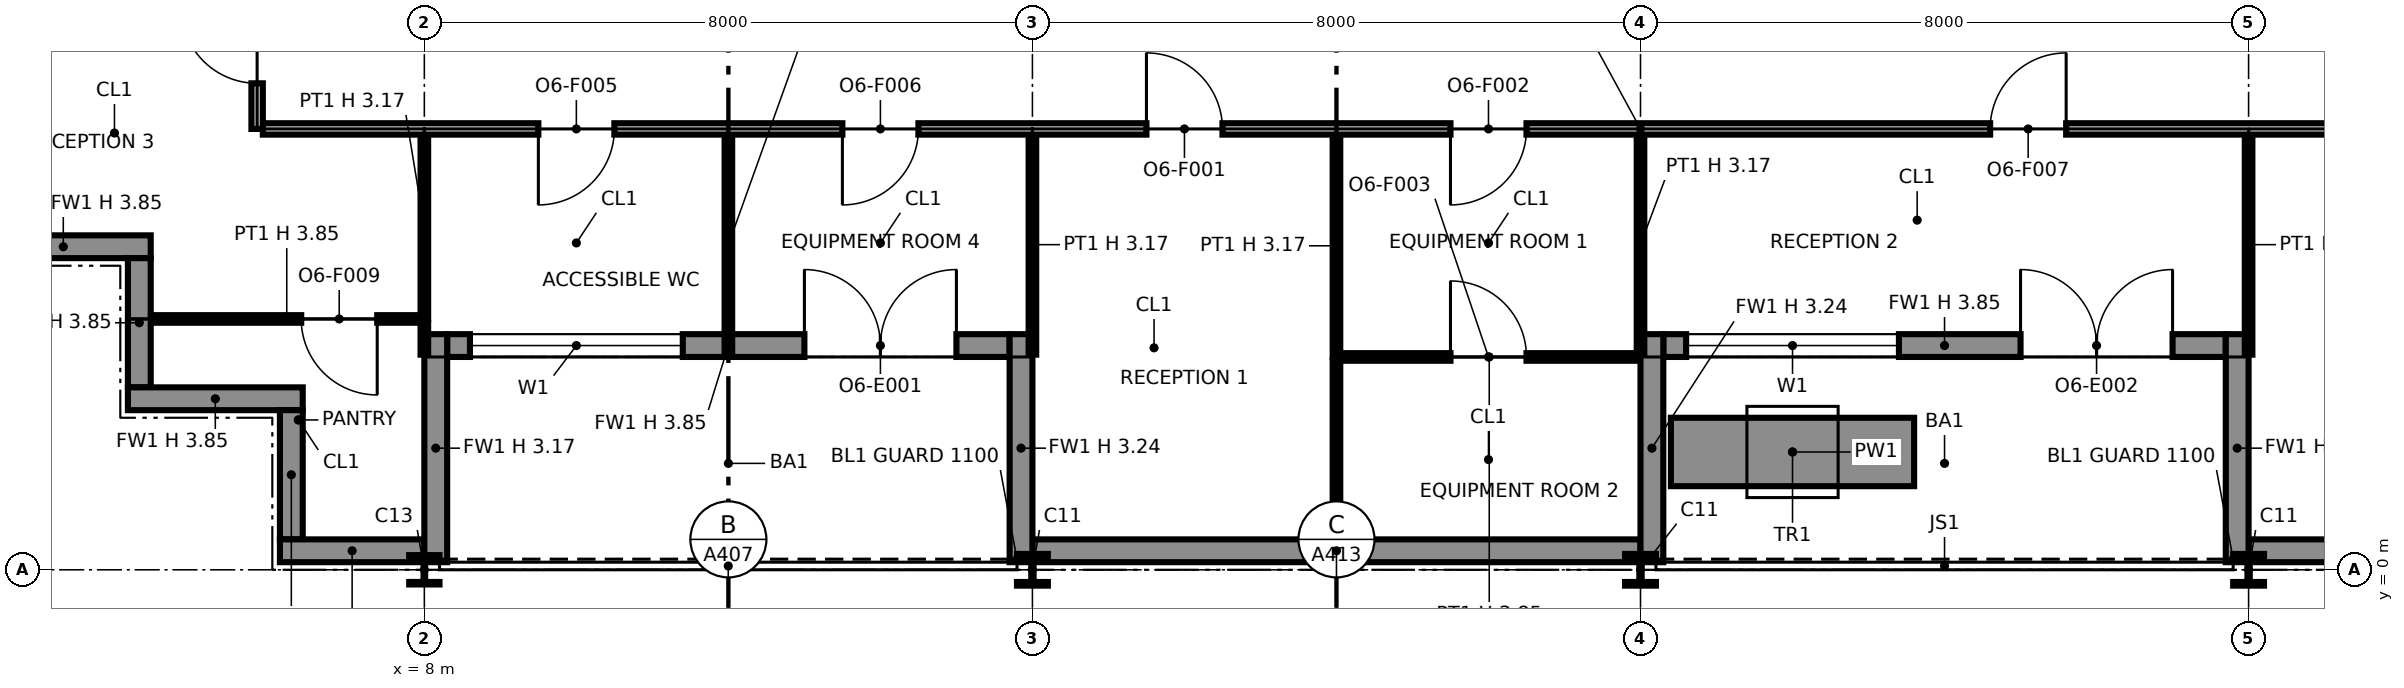
"""IFC4 building model, lengths in metres.
Left out: names, types, materials, properties, quantities, classifications, styles, units other than length and angle.
Written with IfcOpenShell. Run it as: python <this file> out.ifc"""

import sys

from ifc_helpers import new_model, si_unit, direction, frame, frame_2d, origin, origin_2d, place, context, subcontext, project, spatial, polyline, rectangle, i_section, outline, extrude, element, fill, save


model = new_model("IFC4")
c1 = context("Model", 3, precision=1e-05, world=origin(), true_north=direction((0.0, 1.0)))
c2 = subcontext(c1, "Body", "Model", "MODEL_VIEW")
j1 = project(units=[si_unit("LENGTHUNIT", "METRE"), si_unit("PLANEANGLEUNIT", "RADIAN")], contexts=[c1])
p1 = place(None, origin())
s1 = spatial("IfcSite", under=j1, at=p1, CompositionType="ELEMENT")
p2 = place(p1, origin())
s2 = spatial("IfcBuilding", under=s1, at=p2, CompositionType="ELEMENT")
p3 = place(p2, frame((0.0, 0.0, 233.0)))
s3 = spatial("IfcBuildingStorey", under=s2, at=p3, CompositionType="ELEMENT", Elevation=233.0)
p4 = place(p3, frame((8.0, 0.0, 0.0), z_axis=(0.0, 0.0, 1.0), x_axis=(1.0, 0.0, 0.0)))
e1 = element("IfcColumn", 1, at=p4, inside=s3, PredefinedType="COLUMN", context=c2, shape_type="SweptSolid", body=[
    extrude(i_section(OverallWidth=0.399, OverallDepth=0.386, WebThickness=0.021, FlangeThickness=0.033, at=origin_2d()), origin(), (0.0, 0.0, 1.0), 3.85),
])
for number, where, z_axis, x_axis in (
    (2, (16.0, 0.0, 0.0), (0.0, 0.0, 1.0), (1.0, 0.0, 0.0)),
    (3, (24.0, 0.0, 0.0), (0.0, 0.0, 1.0), (1.0, 0.0, 0.0)),
    (4, (32.0, 0.0, 0.0), (0.0, 0.0, 1.0), (1.0, 0.0, 0.0)),
):
    element("IfcColumn", number, at=place(p3, frame(where, z_axis=z_axis, x_axis=x_axis)), inside=s3, PredefinedType="COLUMN", context=c2, shape_type="SweptSolid", body=[
        extrude(i_section(OverallWidth=0.406, OverallDepth=0.417, WebThickness=0.03, FlangeThickness=0.048, at=origin_2d()), origin(), (0.0, 0.0, 1.0), 3.85),
    ])
p5 = place(p3, frame((2.1, 4.25, 0.0), z_axis=(0.0, 0.0, 1.0), x_axis=(1.0, 0.0, 0.0)))
e5 = element("IfcWall", 5, at=p5, inside=s3, PredefinedType="SOLIDWALL", context=c2, shape_type="SweptSolid", body=[
    extrude(rectangle(XDim=2.3, YDim=0.3, at=frame_2d((1.15, 0.0))), origin(), (0.0, 0.0, 1.0), 3.85),
])
p6 = place(p3, frame((4.25, 4.1, 0.0), z_axis=(0.0, 0.0, 1.0), x_axis=(0.0, -1.0, 0.0)))
e6 = element("IfcWall", 6, at=p6, inside=s3, PredefinedType="SOLIDWALL", context=c2, shape_type="SweptSolid", body=[
    extrude(rectangle(XDim=1.7, YDim=0.3, at=frame_2d((0.85, 0.0))), origin(), (0.0, 0.0, 1.0), 3.85),
])
p7 = place(p3, frame((4.1, 2.25, 0.0), z_axis=(0.0, 0.0, 1.0), x_axis=(1.0, 0.0, 0.0)))
e7 = element("IfcWall", 7, at=p7, inside=s3, PredefinedType="SOLIDWALL", context=c2, shape_type="SweptSolid", body=[
    extrude(rectangle(XDim=2.3, YDim=0.3, at=frame_2d((1.15, 0.0))), origin(), (0.0, 0.0, 1.0), 3.85),
])
p8 = place(p3, frame((6.25, 2.1, 0.0), z_axis=(0.0, 0.0, 1.0), x_axis=(0.0, -1.0, 0.0)))
e8 = element("IfcWall", 8, at=p8, inside=s3, PredefinedType="SOLIDWALL", context=c2, shape_type="SweptSolid", body=[
    extrude(rectangle(XDim=1.7, YDim=0.3, at=frame_2d((0.85, 0.0))), origin(), (0.0, 0.0, 1.0), 3.85),
])
p9 = place(p3, frame((6.1, 0.25, 0.0), z_axis=(0.0, 0.0, 1.0), x_axis=(1.0, 0.0, 0.0)))
e9 = element("IfcWall", 9, at=p9, inside=s3, PredefinedType="SOLIDWALL", context=c2, shape_type="SweptSolid", body=[
    extrude(rectangle(XDim=1.9, YDim=0.3, at=frame_2d((0.95, 0.0))), origin(), (0.0, 0.0, 1.0), 3.85),
])
p10 = place(p3, frame((8.3, 2.95, 0.0), z_axis=(0.0, 0.0, 1.0), x_axis=(1.0, 0.0, 0.0)))
e10 = element("IfcWall", 10, at=p10, inside=s3, PredefinedType="SOLIDWALL", context=c2, shape_type="SweptSolid", body=[
    extrude(rectangle(XDim=7.4, YDim=0.3, at=frame_2d((3.7, 0.0))), origin(), (0.0, 0.0, 1.0), 3.85),
])
p11 = place(p10, frame((0.3, 0.0, 0.9)))
e11 = element("IfcOpeningElement", 11, at=p11, cuts=e10, PredefinedType="OPENING", context=c2, shape_type="SweptSolid", body=[
    extrude(rectangle(XDim=2.8, YDim=2.2, at=frame_2d((1.4, 1.1))), frame((0.0, 0.16, 0.0), z_axis=(0.0, -1.0, 0.0), x_axis=(1.0, 0.0, 0.0)), (0.0, 0.0, 1.0), 0.32),
])
p12 = place(p10, frame((4.7, 0.0, 0.0)))
e12 = element("IfcOpeningElement", 12, at=p12, cuts=e10, PredefinedType="OPENING", context=c2, shape_type="SweptSolid", body=[
    extrude(rectangle(XDim=2.0, YDim=2.4, at=frame_2d((1.0, 1.2))), frame((0.0, 0.16, 0.0), z_axis=(0.0, -1.0, 0.0), x_axis=(1.0, 0.0, 0.0)), (0.0, 0.0, 1.0), 0.32),
])
p13 = place(p3, frame((8.15, 0.1, 0.0), z_axis=(0.0, 0.0, 1.0), x_axis=(0.0, 1.0, 0.0)))
e13 = element("IfcWall", 13, at=p13, inside=s3, PredefinedType="SOLIDWALL", context=c2, shape_type="SweptSolid", body=[
    extrude(rectangle(XDim=3.0, YDim=0.3, at=frame_2d((1.5, 0.0))), origin(), (0.0, 0.0, 1.0), 3.171),
])
p14 = place(p3, frame((15.85, 0.1, 0.0), z_axis=(0.0, 0.0, 1.0), x_axis=(0.0, 1.0, 0.0)))
e14 = element("IfcWall", 14, at=p14, inside=s3, PredefinedType="SOLIDWALL", context=c2, shape_type="SweptSolid", body=[
    extrude(rectangle(XDim=3.0, YDim=0.3, at=frame_2d((1.5, 0.0))), origin(), (0.0, 0.0, 1.0), 3.237),
])
p15 = place(p3, frame((16.0, 0.25, 0.0), z_axis=(0.0, 0.0, 1.0), x_axis=(1.0, 0.0, 0.0)))
e15 = element("IfcWall", 15, at=p15, inside=s3, PredefinedType="SOLIDWALL", context=c2, shape_type="SweptSolid", body=[
    extrude(rectangle(XDim=8.0, YDim=0.3, at=frame_2d((4.0, 0.0))), origin(), (0.0, 0.0, 1.0), 3.85),
])
p16 = place(p3, frame((24.3, 2.95, 0.0), z_axis=(0.0, 0.0, 1.0), x_axis=(1.0, 0.0, 0.0)))
e16 = element("IfcWall", 16, at=p16, inside=s3, PredefinedType="SOLIDWALL", context=c2, shape_type="SweptSolid", body=[
    extrude(rectangle(XDim=7.4, YDim=0.3, at=frame_2d((3.7, 0.0))), origin(), (0.0, 0.0, 1.0), 3.85),
])
p17 = place(p16, frame((0.3, 0.0, 0.9)))
e17 = element("IfcOpeningElement", 17, at=p17, cuts=e16, PredefinedType="OPENING", context=c2, shape_type="SweptSolid", body=[
    extrude(rectangle(XDim=2.8, YDim=2.2, at=frame_2d((1.4, 1.1))), frame((0.0, 0.16, 0.0), z_axis=(0.0, -1.0, 0.0), x_axis=(1.0, 0.0, 0.0)), (0.0, 0.0, 1.0), 0.32),
])
p18 = place(p16, frame((4.7, 0.0, 0.0)))
e18 = element("IfcOpeningElement", 18, at=p18, cuts=e16, PredefinedType="OPENING", context=c2, shape_type="SweptSolid", body=[
    extrude(rectangle(XDim=2.0, YDim=2.4, at=frame_2d((1.0, 1.2))), frame((0.0, 0.16, 0.0), z_axis=(0.0, -1.0, 0.0), x_axis=(1.0, 0.0, 0.0)), (0.0, 0.0, 1.0), 0.32),
])
for number, where, z_axis, x_axis in (
    (19, (24.15, 0.1, 0.0), (0.0, 0.0, 1.0), (0.0, 1.0, 0.0)),
    (20, (31.85, 0.1, 0.0), (0.0, 0.0, 1.0), (0.0, 1.0, 0.0)),
):
    element("IfcWall", number, at=place(p3, frame(where, z_axis=z_axis, x_axis=x_axis)), inside=s3, PredefinedType="SOLIDWALL", context=c2, shape_type="SweptSolid", body=[
        extrude(rectangle(XDim=3.0, YDim=0.3, at=frame_2d((1.5, 0.0))), origin(), (0.0, 0.0, 1.0), 3.237),
    ])
p19 = place(p3, frame((32.0, 0.25, 0.0), z_axis=(0.0, 0.0, 1.0), x_axis=(1.0, 0.0, 0.0)))
e21 = element("IfcWall", 21, at=p19, inside=s3, PredefinedType="SOLIDWALL", context=c2, shape_type="SweptSolid", body=[
    extrude(rectangle(XDim=9.9, YDim=0.3, at=frame_2d((4.95, 0.0))), origin(), (0.0, 0.0, 1.0), 3.85),
])
p20 = place(p3, frame((24.4, 1.55, 0.0), z_axis=(0.0, 0.0, 1.0), x_axis=(1.0, 0.0, 0.0)))
e22 = element("IfcWall", 22, at=p20, inside=s3, PredefinedType="SOLIDWALL", context=c2, shape_type="SweptSolid", body=[
    extrude(rectangle(XDim=3.2, YDim=0.9, at=frame_2d((1.6, 0.0))), origin(), (0.0, 0.0, 1.0), 0.6),
])
p21 = place(p3, frame((20.0, 0.13, 0.0), z_axis=(0.0, 0.0, 1.0), x_axis=(0.0, 1.0, 0.0)))
e23 = element("IfcWall", 23, at=p21, inside=s3, PredefinedType="PARTITIONING", context=c2, shape_type="SweptSolid", body=[
    extrude(rectangle(XDim=2.62, YDim=0.1, at=frame_2d((1.31, 0.0))), origin(), (0.0, 0.0, 1.0), 3.85),
])
p22 = place(p3, frame((20.05, 2.8, 0.0), z_axis=(0.0, 0.0, 1.0), x_axis=(1.0, 0.0, 0.0)))
e24 = element("IfcWall", 24, at=p22, inside=s3, PredefinedType="PARTITIONING", context=c2, shape_type="SweptSolid", body=[
    extrude(rectangle(XDim=3.92, YDim=0.1, at=frame_2d((1.96, 0.0))), origin(), (0.0, 0.0, 1.0), 3.85),
])
p23 = place(p22, frame((1.45, 0.0, 0.0)))
e25 = element("IfcOpeningElement", 25, at=p23, cuts=e24, PredefinedType="OPENING", context=c2, shape_type="SweptSolid", body=[
    extrude(rectangle(XDim=1.0, YDim=2.1, at=frame_2d((0.5, 1.05))), frame((0.0, 0.06, 0.0), z_axis=(0.0, -1.0, 0.0), x_axis=(1.0, 0.0, 0.0)), (0.0, 0.0, 1.0), 0.12),
])
p24 = place(p3, frame((20.0, 2.8, 0.0), z_axis=(0.0, 0.0, 1.0), x_axis=(0.0, 1.0, 0.0)))
e26 = element("IfcWall", 26, at=p24, inside=s3, PredefinedType="PARTITIONING", context=c2, shape_type="SweptSolid", body=[
    extrude(rectangle(XDim=2.925, YDim=0.1, at=frame_2d((1.462, 0.0))), origin(), (0.0, 0.0, 1.0), 3.172),
])
p25 = place(p3, frame((8.0, 2.83, 0.0), z_axis=(0.0, 0.0, 1.0), x_axis=(0.0, 1.0, 0.0)))
e27 = element("IfcWall", 27, at=p25, inside=s3, PredefinedType="PARTITIONING", context=c2, shape_type="SweptSolid", body=[
    extrude(rectangle(XDim=0.42, YDim=0.1, at=frame_2d((0.21, 0.0))), origin(), (0.0, 0.0, 1.0), 3.172),
])
for number, where, z_axis, x_axis in (
    (28, (12.0, 2.83, 0.0), (0.0, 0.0, 1.0), (0.0, 1.0, 0.0)),
    (29, (16.0, 2.83, 0.0), (0.0, 0.0, 1.0), (0.0, 1.0, 0.0)),
    (30, (24.0, 2.83, 0.0), (0.0, 0.0, 1.0), (0.0, 1.0, 0.0)),
    (31, (32.0, 2.83, 0.0), (0.0, 0.0, 1.0), (0.0, 1.0, 0.0)),
):
    element("IfcWall", number, at=place(p3, frame(where, z_axis=z_axis, x_axis=x_axis)), inside=s3, PredefinedType="PARTITIONING", context=c2, shape_type="SweptSolid", body=[
        extrude(rectangle(XDim=2.895, YDim=0.1, at=frame_2d((1.448, 0.0))), origin(), (0.0, 0.0, 1.0), 3.172),
    ])
p26 = place(p3, frame((4.43, 3.3, 0.0), z_axis=(0.0, 0.0, 1.0), x_axis=(1.0, 0.0, 0.0)))
e32 = element("IfcWall", 32, at=p26, inside=s3, PredefinedType="PARTITIONING", context=c2, shape_type="SweptSolid", body=[
    extrude(rectangle(XDim=3.52, YDim=0.1, at=frame_2d((1.76, 0.0))), origin(), (0.0, 0.0, 1.0), 3.85),
])
p27 = place(p26, frame((2.95, 0.0, 0.0), z_axis=(0.0, 0.0, 1.0), x_axis=(-1.0, 0.0, 0.0)))
e33 = element("IfcOpeningElement", 33, at=p27, cuts=e32, PredefinedType="OPENING", context=c2, shape_type="SweptSolid", body=[
    extrude(rectangle(XDim=1.0, YDim=2.1, at=frame_2d((0.5, 1.05))), frame((0.0, 0.06, 0.0), z_axis=(0.0, -1.0, 0.0), x_axis=(1.0, 0.0, 0.0)), (0.0, 0.0, 1.0), 0.12),
])
p28 = place(p3, frame((8.0, 3.3, 0.0), z_axis=(0.0, 0.0, 1.0), x_axis=(0.0, 1.0, 0.0)))
e34 = element("IfcWall", 34, at=p28, inside=s3, PredefinedType="PARTITIONING", context=c2, shape_type="SweptSolid", body=[
    extrude(rectangle(XDim=2.425, YDim=0.1, at=frame_2d((1.212, 0.0))), origin(), (0.0, 0.0, 1.0), 3.172),
])
p29 = place(p3, frame((5.875, 5.8, 0.0), z_axis=(0.0, 0.0, 1.0), x_axis=(1.0, 0.0, 0.0)))
e35 = element("IfcWall", 35, at=p29, inside=s3, PredefinedType="PARTITIONING", context=c2, shape_type="SweptSolid", body=[
    extrude(rectangle(XDim=36.25, YDim=0.15, at=frame_2d((18.125, 0.0))), origin(), (0.0, 0.0, 1.0), 3.85),
])
p30 = place(p29, frame((11.625, 0.0, 0.0)))
e36 = element("IfcOpeningElement", 36, at=p30, cuts=e35, PredefinedType="OPENING", context=c2, shape_type="SweptSolid", body=[
    extrude(rectangle(XDim=1.0, YDim=2.1, at=frame_2d((0.5, 1.05))), frame((0.0, 0.085, 0.0), z_axis=(0.0, -1.0, 0.0), x_axis=(1.0, 0.0, 0.0)), (0.0, 0.0, 1.0), 0.17),
])
p31 = place(p29, frame((16.625, 0.0, 0.0), z_axis=(0.0, 0.0, 1.0), x_axis=(-1.0, 0.0, 0.0)))
e37 = element("IfcOpeningElement", 37, at=p31, cuts=e35, PredefinedType="OPENING", context=c2, shape_type="SweptSolid", body=[
    extrude(rectangle(XDim=1.0, YDim=2.1, at=frame_2d((0.5, 1.05))), frame((0.0, 0.085, 0.0), z_axis=(0.0, -1.0, 0.0), x_axis=(1.0, 0.0, 0.0)), (0.0, 0.0, 1.0), 0.17),
])
p32 = place(p29, frame((29.625, 0.0, 0.0)))
e38 = element("IfcOpeningElement", 38, at=p32, cuts=e35, PredefinedType="OPENING", context=c2, shape_type="SweptSolid", body=[
    extrude(rectangle(XDim=1.0, YDim=2.1, at=frame_2d((0.5, 1.05))), frame((0.0, 0.085, 0.0), z_axis=(0.0, -1.0, 0.0), x_axis=(1.0, 0.0, 0.0)), (0.0, 0.0, 1.0), 0.17),
])
p33 = place(p29, frame((4.625, 0.0, 0.0), z_axis=(0.0, 0.0, 1.0), x_axis=(-1.0, 0.0, 0.0)))
e39 = element("IfcOpeningElement", 39, at=p33, cuts=e35, PredefinedType="OPENING", context=c2, shape_type="SweptSolid", body=[
    extrude(rectangle(XDim=1.0, YDim=2.1, at=frame_2d((0.5, 1.05))), frame((0.0, 0.085, 0.0), z_axis=(0.0, -1.0, 0.0), x_axis=(1.0, 0.0, 0.0)), (0.0, 0.0, 1.0), 0.17),
])
p34 = place(p29, frame((8.625, 0.0, 0.0), z_axis=(0.0, 0.0, 1.0), x_axis=(-1.0, 0.0, 0.0)))
e40 = element("IfcOpeningElement", 40, at=p34, cuts=e35, PredefinedType="OPENING", context=c2, shape_type="SweptSolid", body=[
    extrude(rectangle(XDim=1.0, YDim=2.1, at=frame_2d((0.5, 1.05))), frame((0.0, 0.085, 0.0), z_axis=(0.0, -1.0, 0.0), x_axis=(1.0, 0.0, 0.0)), (0.0, 0.0, 1.0), 0.17),
])
p35 = place(p29, frame((22.725, 0.0, 0.0)))
e41 = element("IfcOpeningElement", 41, at=p35, cuts=e35, PredefinedType="OPENING", context=c2, shape_type="SweptSolid", body=[
    extrude(rectangle(XDim=1.0, YDim=2.1, at=frame_2d((0.5, 1.05))), frame((0.0, 0.085, 0.0), z_axis=(0.0, -1.0, 0.0), x_axis=(1.0, 0.0, 0.0)), (0.0, 0.0, 1.0), 0.17),
])
p36 = place(p3, frame((5.8, 5.8, 0.0), z_axis=(0.0, 0.0, 1.0), x_axis=(0.0, 1.0, 0.0)))
e42 = element("IfcWall", 42, at=p36, inside=s3, PredefinedType="PARTITIONING", context=c2, shape_type="SweptSolid", body=[
    extrude(outline(polyline([(0.0, 0.0), (13.575, 0.0), (13.575, 3.85), (10.5, 3.85), (10.498, 3.172), (9.902, 3.172), (9.9, 3.85), (6.5, 3.85), (6.498, 3.172), (5.902, 3.172), (5.9, 3.85), (2.5, 3.85), (2.498, 3.172), (1.902, 3.172), (1.9, 3.85), (0.0, 3.85), (0.0, 0.0)])), frame((0.0, 0.075, 0.0), z_axis=(0.0, -1.0, 0.0), x_axis=(1.0, 0.0, 0.0)), (0.0, 0.0, 1.0), 0.15),
])
p37 = place(p36, frame((0.6, 0.0, 0.0)))
e43 = element("IfcOpeningElement", 43, at=p37, cuts=e42, PredefinedType="OPENING", context=c2, shape_type="SweptSolid", body=[
    extrude(rectangle(XDim=1.0, YDim=2.1, at=frame_2d((0.5, 1.05))), frame((0.0, 0.085, 0.0), z_axis=(0.0, -1.0, 0.0), x_axis=(1.0, 0.0, 0.0)), (0.0, 0.0, 1.0), 0.17),
])
p38 = place(p36, frame((3.7, 0.0, 0.0)))
e44 = element("IfcOpeningElement", 44, at=p38, cuts=e42, PredefinedType="OPENING", context=c2, shape_type="SweptSolid", body=[
    extrude(rectangle(XDim=1.0, YDim=2.1, at=frame_2d((0.5, 1.05))), frame((0.0, 0.085, 0.0), z_axis=(0.0, -1.0, 0.0), x_axis=(1.0, 0.0, 0.0)), (0.0, 0.0, 1.0), 0.17),
])
p39 = place(p36, frame((7.7, 0.0, 0.0)))
e45 = element("IfcOpeningElement", 45, at=p39, cuts=e42, PredefinedType="OPENING", context=c2, shape_type="SweptSolid", body=[
    extrude(rectangle(XDim=1.0, YDim=2.1, at=frame_2d((0.5, 1.05))), frame((0.0, 0.085, 0.0), z_axis=(0.0, -1.0, 0.0), x_axis=(1.0, 0.0, 0.0)), (0.0, 0.0, 1.0), 0.17),
])
p40 = place(p36, frame((11.425, 0.0, 0.0)))
e46 = element("IfcOpeningElement", 46, at=p40, cuts=e42, PredefinedType="OPENING", context=c2, shape_type="SweptSolid", body=[
    extrude(rectangle(XDim=1.0, YDim=2.1, at=frame_2d((0.5, 1.05))), frame((0.0, 0.085, 0.0), z_axis=(0.0, -1.0, 0.0), x_axis=(1.0, 0.0, 0.0)), (0.0, 0.0, 1.0), 0.17),
])
p41 = place(p11, origin())
e47 = element("IfcWindow", 47, at=p41, inside=s3, PartitioningType="SINGLE_PANEL", PredefinedType="WINDOW", context=c2, shape_type="SweptSolid", body=[
    extrude(rectangle(XDim=2.8, YDim=2.2, at=frame_2d((1.4, 1.1))), frame((0.0, 0.03, 0.0), z_axis=(0.0, -1.0, 0.0), x_axis=(1.0, 0.0, 0.0)), (0.0, 0.0, 1.0), 0.06),
])
fill(e11, e47)
p42 = place(p12, origin())
e48 = element("IfcDoor", 48, at=p42, inside=s3, OperationType="DOUBLE_DOOR_SINGLE_SWING", PredefinedType="DOOR", context=c2, shape_type="SweptSolid", body=[
    extrude(rectangle(XDim=2.0, YDim=2.4, at=frame_2d((1.0, 1.2))), frame((0.0, 0.025, 0.0), z_axis=(0.0, -1.0, 0.0), x_axis=(1.0, 0.0, 0.0)), (0.0, 0.0, 1.0), 0.05),
])
fill(e12, e48)
p43 = place(p17, origin())
e49 = element("IfcWindow", 49, at=p43, inside=s3, PartitioningType="SINGLE_PANEL", PredefinedType="WINDOW", context=c2, shape_type="SweptSolid", body=[
    extrude(rectangle(XDim=2.8, YDim=2.2, at=frame_2d((1.4, 1.1))), frame((0.0, 0.03, 0.0), z_axis=(0.0, -1.0, 0.0), x_axis=(1.0, 0.0, 0.0)), (0.0, 0.0, 1.0), 0.06),
])
fill(e17, e49)
p44 = place(p18, origin())
e50 = element("IfcDoor", 50, at=p44, inside=s3, OperationType="DOUBLE_DOOR_SINGLE_SWING", PredefinedType="DOOR", context=c2, shape_type="SweptSolid", body=[
    extrude(rectangle(XDim=2.0, YDim=2.4, at=frame_2d((1.0, 1.2))), frame((0.0, 0.025, 0.0), z_axis=(0.0, -1.0, 0.0), x_axis=(1.0, 0.0, 0.0)), (0.0, 0.0, 1.0), 0.05),
])
fill(e18, e50)
p45 = place(p30, origin())
e51 = element("IfcDoor", 51, at=p45, inside=s3, OperationType="SINGLE_SWING_LEFT", PredefinedType="DOOR", context=c2, shape_type="SweptSolid", body=[
    extrude(rectangle(XDim=1.0, YDim=2.1, at=frame_2d((0.5, 1.05))), frame((0.0, 0.025, 0.0), z_axis=(0.0, -1.0, 0.0), x_axis=(1.0, 0.0, 0.0)), (0.0, 0.0, 1.0), 0.05),
])
fill(e36, e51)
p46 = place(p31, origin())
e52 = element("IfcDoor", 52, at=p46, inside=s3, OperationType="SINGLE_SWING_RIGHT", PredefinedType="DOOR", context=c2, shape_type="SweptSolid", body=[
    extrude(rectangle(XDim=1.0, YDim=2.1, at=frame_2d((0.5, 1.05))), frame((0.0, 0.025, 0.0), z_axis=(0.0, -1.0, 0.0), x_axis=(1.0, 0.0, 0.0)), (0.0, 0.0, 1.0), 0.05),
])
fill(e37, e52)
p47 = place(p23, origin())
e53 = element("IfcDoor", 53, at=p47, inside=s3, OperationType="SINGLE_SWING_LEFT", PredefinedType="DOOR", context=c2, shape_type="SweptSolid", body=[
    extrude(rectangle(XDim=1.0, YDim=2.1, at=frame_2d((0.5, 1.05))), frame((0.0, 0.025, 0.0), z_axis=(0.0, -1.0, 0.0), x_axis=(1.0, 0.0, 0.0)), (0.0, 0.0, 1.0), 0.05),
])
fill(e25, e53)
p48 = place(p33, origin())
e54 = element("IfcDoor", 54, at=p48, inside=s3, OperationType="SINGLE_SWING_RIGHT", PredefinedType="DOOR", context=c2, shape_type="SweptSolid", body=[
    extrude(rectangle(XDim=1.0, YDim=2.1, at=frame_2d((0.5, 1.05))), frame((0.0, 0.025, 0.0), z_axis=(0.0, -1.0, 0.0), x_axis=(1.0, 0.0, 0.0)), (0.0, 0.0, 1.0), 0.05),
])
fill(e39, e54)
p49 = place(p34, origin())
e55 = element("IfcDoor", 55, at=p49, inside=s3, OperationType="SINGLE_SWING_RIGHT", PredefinedType="DOOR", context=c2, shape_type="SweptSolid", body=[
    extrude(rectangle(XDim=1.0, YDim=2.1, at=frame_2d((0.5, 1.05))), frame((0.0, 0.025, 0.0), z_axis=(0.0, -1.0, 0.0), x_axis=(1.0, 0.0, 0.0)), (0.0, 0.0, 1.0), 0.05),
])
fill(e40, e55)
p50 = place(p35, origin())
e56 = element("IfcDoor", 56, at=p50, inside=s3, OperationType="SINGLE_SWING_RIGHT", PredefinedType="DOOR", context=c2, shape_type="SweptSolid", body=[
    extrude(rectangle(XDim=1.0, YDim=2.1, at=frame_2d((0.5, 1.05))), frame((0.0, 0.025, 0.0), z_axis=(0.0, -1.0, 0.0), x_axis=(1.0, 0.0, 0.0)), (0.0, 0.0, 1.0), 0.05),
])
fill(e41, e56)
p51 = place(p37, origin())
e57 = element("IfcDoor", 57, at=p51, inside=s3, OperationType="SINGLE_SWING_RIGHT", PredefinedType="DOOR", context=c2, shape_type="SweptSolid", body=[
    extrude(rectangle(XDim=1.0, YDim=2.1, at=frame_2d((0.5, 1.05))), frame((0.0, 0.025, 0.0), z_axis=(0.0, -1.0, 0.0), x_axis=(1.0, 0.0, 0.0)), (0.0, 0.0, 1.0), 0.05),
])
fill(e43, e57)
p52 = place(p27, origin())
e58 = element("IfcDoor", 58, at=p52, inside=s3, OperationType="SINGLE_SWING_LEFT", PredefinedType="DOOR", context=c2, shape_type="SweptSolid", body=[
    extrude(rectangle(XDim=1.0, YDim=2.1, at=frame_2d((0.5, 1.05))), frame((0.0, 0.025, 0.0), z_axis=(0.0, -1.0, 0.0), x_axis=(1.0, 0.0, 0.0)), (0.0, 0.0, 1.0), 0.05),
])
fill(e33, e58)
save(model, sys.argv[1])
